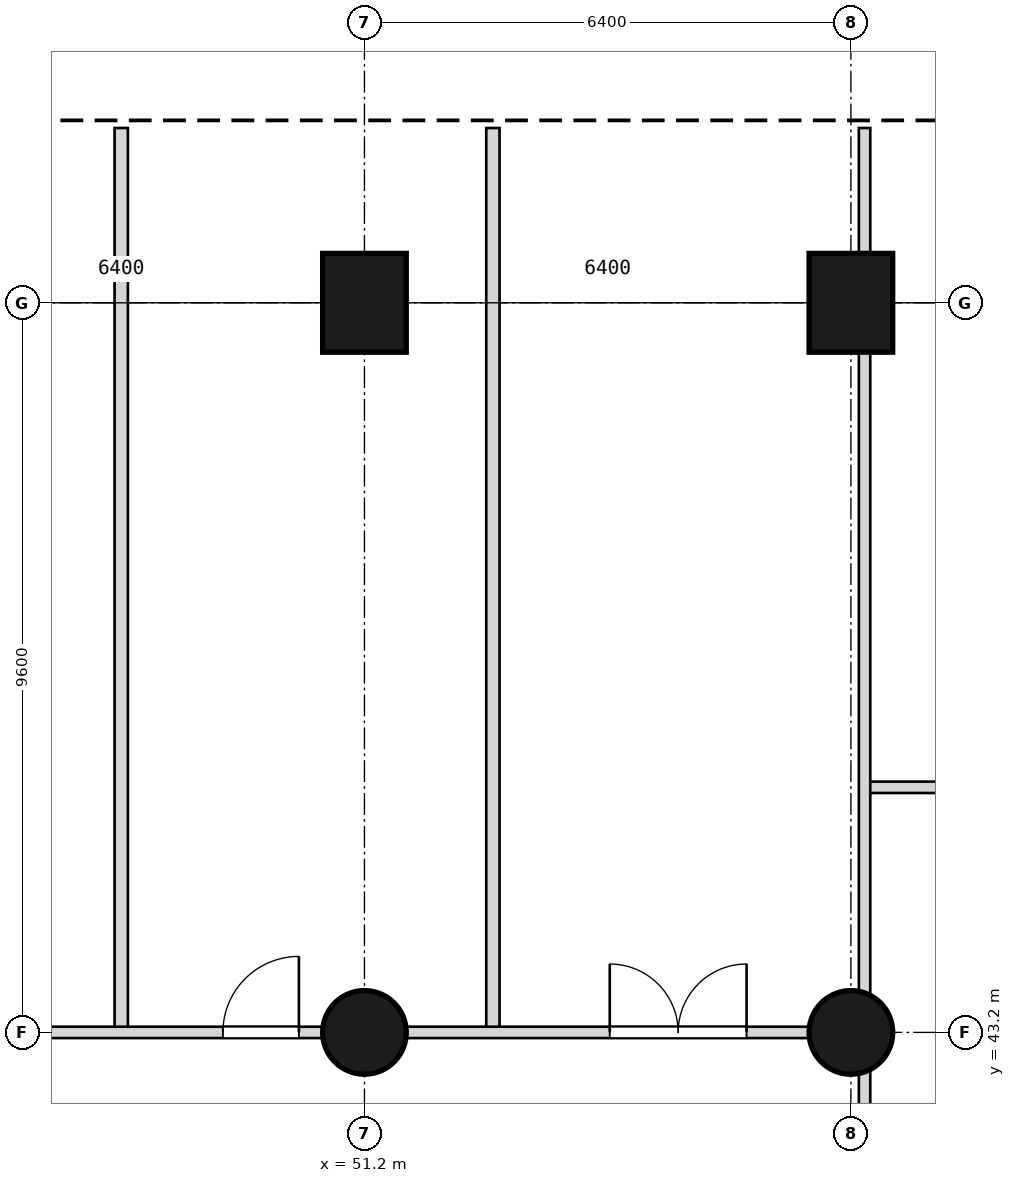
"""IFC4 building model, lengths in metres.
Left out: names, types, materials, properties, quantities, classifications, styles, units other than length and angle.
Written with IfcOpenShell. Run it as: python <this file> out.ifc"""

import sys

from ifc_helpers import new_model, si_unit, direction, frame, frame_2d, origin, origin_2d, place, context, subcontext, project, spatial, rectangle, circle, extrude, element, fill, save


model = new_model("IFC4")
c1 = context("Model", 3, precision=1e-05, world=origin(), true_north=direction((0.0, 1.0)))
c2 = subcontext(c1, "Body", "Model", "MODEL_VIEW")
j1 = project(units=[si_unit("LENGTHUNIT", "METRE"), si_unit("PLANEANGLEUNIT", "RADIAN")], contexts=[c1])
p1 = place(None, origin())
s1 = spatial("IfcSite", under=j1, at=p1, CompositionType="ELEMENT")
p2 = place(p1, origin())
s2 = spatial("IfcBuilding", under=s1, at=p2, CompositionType="ELEMENT")
p3 = place(p2, frame((0.0, 0.0, 8.4)))
s3 = spatial("IfcBuildingStorey", under=s2, at=p3, CompositionType="ELEMENT", Elevation=8.4)
p4 = place(p3, frame((51.2, 43.2, 0.0), z_axis=(0.0, 0.0, 1.0), x_axis=(1.0, 0.0, 0.0)))
e1 = element("IfcColumn", 1, at=p4, inside=s3, PredefinedType="COLUMN", context=c2, shape_type="SweptSolid", body=[
    extrude(circle(Radius=0.55, at=origin_2d()), origin(), (0.0, 0.0, 1.0), 4.5),
])
p5 = place(p3, frame((51.2, 52.8, 0.0), z_axis=(0.0, 0.0, 1.0), x_axis=(1.0, 0.0, 0.0)))
e2 = element("IfcColumn", 2, at=p5, inside=s3, PredefinedType="COLUMN", context=c2, shape_type="SweptSolid", body=[
    extrude(rectangle(XDim=1.1, YDim=1.3, at=origin_2d()), origin(), (0.0, 0.0, 1.0), 4.5),
])
p6 = place(p3, frame((57.6, 43.2, 0.0), z_axis=(0.0, 0.0, 1.0), x_axis=(1.0, 0.0, 0.0)))
e3 = element("IfcColumn", 3, at=p6, inside=s3, PredefinedType="COLUMN", context=c2, shape_type="SweptSolid", body=[
    extrude(circle(Radius=0.55, at=origin_2d()), origin(), (0.0, 0.0, 1.0), 4.5),
])
p7 = place(p3, frame((57.6, 52.8, 0.0), z_axis=(0.0, 0.0, 1.0), x_axis=(1.0, 0.0, 0.0)))
e4 = element("IfcColumn", 4, at=p7, inside=s3, PredefinedType="COLUMN", context=c2, shape_type="SweptSolid", body=[
    extrude(rectangle(XDim=1.1, YDim=1.3, at=origin_2d()), origin(), (0.0, 0.0, 1.0), 4.5),
])
p8 = place(p3, frame((48.0, 43.2, 0.0), z_axis=(0.0, 0.0, 1.0), x_axis=(0.0, 1.0, 0.0)))
e5 = element("IfcWall", 5, at=p8, inside=s3, PredefinedType="PARTITIONING", context=c2, shape_type="SweptSolid", body=[
    extrude(rectangle(XDim=11.9, YDim=0.175, at=frame_2d((5.95, 0.0))), origin(), (0.0, 0.0, 1.0), 3.68),
])
p9 = place(p3, frame((52.89, 43.2, 0.0), z_axis=(0.0, 0.0, 1.0), x_axis=(0.0, 1.0, 0.0)))
e6 = element("IfcWall", 6, at=p9, inside=s3, PredefinedType="PARTITIONING", context=c2, shape_type="SweptSolid", body=[
    extrude(rectangle(XDim=11.9, YDim=0.175, at=frame_2d((5.95, 0.0))), origin(), (0.0, 0.0, 1.0), 4.28),
])
p10 = place(p3, frame((31.82, 43.2, 0.0), z_axis=(0.0, 0.0, 1.0), x_axis=(1.0, 0.0, 0.0)))
e7 = element("IfcWall", 7, at=p10, inside=s3, PredefinedType="PARTITIONING", context=c2, shape_type="SweptSolid", body=[
    extrude(rectangle(XDim=25.96, YDim=0.15, at=frame_2d((12.98, 0.0))), origin(), (0.0, 0.0, 1.0), 3.48),
])
p11 = place(p10, frame((3.175, 0.0, 0.0)))
e8 = element("IfcOpeningElement", 8, at=p11, cuts=e7, PredefinedType="OPENING", context=c2, shape_type="SweptSolid", body=[
    extrude(rectangle(XDim=1.8, YDim=2.1, at=frame_2d((0.9, 1.05))), frame((0.0, 0.085, 0.0), z_axis=(0.0, -1.0, 0.0), x_axis=(1.0, 0.0, 0.0)), (0.0, 0.0, 1.0), 0.17),
])
p12 = place(p10, frame((10.325, 0.0, 0.0)))
e9 = element("IfcOpeningElement", 9, at=p12, cuts=e7, PredefinedType="OPENING", context=c2, shape_type="SweptSolid", body=[
    extrude(rectangle(XDim=1.8, YDim=2.1, at=frame_2d((0.9, 1.05))), frame((0.0, 0.085, 0.0), z_axis=(0.0, -1.0, 0.0), x_axis=(1.0, 0.0, 0.0)), (0.0, 0.0, 1.0), 0.17),
])
p13 = place(p10, frame((17.518, 0.0, 0.0)))
e10 = element("IfcOpeningElement", 10, at=p13, cuts=e7, PredefinedType="OPENING", context=c2, shape_type="SweptSolid", body=[
    extrude(rectangle(XDim=1.0, YDim=2.1, at=frame_2d((0.5, 1.05))), frame((0.0, 0.085, 0.0), z_axis=(0.0, -1.0, 0.0), x_axis=(1.0, 0.0, 0.0)), (0.0, 0.0, 1.0), 0.17),
])
p14 = place(p10, frame((22.607, 0.0, 0.0)))
e11 = element("IfcOpeningElement", 11, at=p14, cuts=e7, PredefinedType="OPENING", context=c2, shape_type="SweptSolid", body=[
    extrude(rectangle(XDim=1.8, YDim=2.1, at=frame_2d((0.9, 1.05))), frame((0.0, 0.085, 0.0), z_axis=(0.0, -1.0, 0.0), x_axis=(1.0, 0.0, 0.0)), (0.0, 0.0, 1.0), 0.17),
])
p15 = place(p3, frame((57.78, 46.425, 0.0), z_axis=(0.0, 0.0, 1.0), x_axis=(1.0, 0.0, 0.0)))
e12 = element("IfcWall", 12, at=p15, inside=s3, PredefinedType="PARTITIONING", context=c2, shape_type="SweptSolid", body=[
    extrude(rectangle(XDim=5.97, YDim=0.15, at=frame_2d((2.985, 0.0))), origin(), (0.0, 0.0, 1.0), 4.28),
])
p16 = place(p15, frame((2.52, 0.0, 0.0)))
e13 = element("IfcOpeningElement", 13, at=p16, cuts=e12, PredefinedType="OPENING", context=c2, shape_type="SweptSolid", body=[
    extrude(rectangle(XDim=1.0, YDim=2.1, at=frame_2d((0.5, 1.05))), frame((0.0, 0.085, 0.0), z_axis=(0.0, -1.0, 0.0), x_axis=(1.0, 0.0, 0.0)), (0.0, 0.0, 1.0), 0.17),
])
p17 = place(p3, frame((57.78, 39.375, 0.0), z_axis=(0.0, 0.0, 1.0), x_axis=(0.0, 1.0, 0.0)))
e14 = element("IfcWall", 14, at=p17, inside=s3, PredefinedType="PARTITIONING", context=c2, shape_type="SweptSolid", body=[
    extrude(rectangle(XDim=3.325, YDim=0.15, at=frame_2d((1.663, 0.0))), origin(), (0.0, 0.0, 1.0), 3.38),
])
p18 = place(p3, frame((57.78, 43.7, 0.0), z_axis=(0.0, 0.0, 1.0), x_axis=(0.0, 1.0, 0.0)))
e15 = element("IfcWall", 15, at=p18, inside=s3, PredefinedType="PARTITIONING", context=c2, shape_type="SweptSolid", body=[
    extrude(rectangle(XDim=8.47, YDim=0.15, at=frame_2d((4.235, 0.0))), origin(), (0.0, 0.0, 1.0), 3.38),
])
p19 = place(p3, frame((57.78, 53.43, 0.0), z_axis=(0.0, 0.0, 1.0), x_axis=(0.0, 1.0, 0.0)))
e16 = element("IfcWall", 16, at=p19, inside=s3, PredefinedType="PARTITIONING", context=c2, shape_type="SweptSolid", body=[
    extrude(rectangle(XDim=1.67, YDim=0.15, at=frame_2d((0.835, 0.0))), origin(), (0.0, 0.0, 1.0), 3.38),
])
p20 = place(p13, origin())
e17 = element("IfcDoor", 17, at=p20, inside=s3, OperationType="SINGLE_SWING_RIGHT", PredefinedType="DOOR", context=c2, shape_type="SweptSolid", body=[
    extrude(rectangle(XDim=1.0, YDim=2.1, at=frame_2d((0.5, 1.05))), frame((0.0, 0.025, 0.0), z_axis=(0.0, -1.0, 0.0), x_axis=(1.0, 0.0, 0.0)), (0.0, 0.0, 1.0), 0.05),
])
fill(e10, e17)
p21 = place(p14, origin())
e18 = element("IfcDoor", 18, at=p21, inside=s3, OperationType="DOUBLE_DOOR_SINGLE_SWING", PredefinedType="DOOR", context=c2, shape_type="SweptSolid", body=[
    extrude(rectangle(XDim=1.8, YDim=2.1, at=frame_2d((0.9, 1.05))), frame((0.0, 0.025, 0.0), z_axis=(0.0, -1.0, 0.0), x_axis=(1.0, 0.0, 0.0)), (0.0, 0.0, 1.0), 0.05),
])
fill(e11, e18)
save(model, sys.argv[1])
